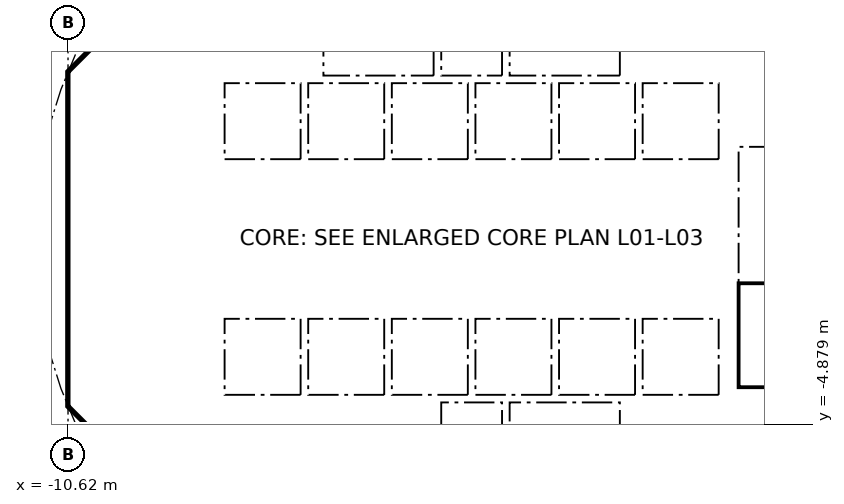
"""IFC4 building model, lengths in metres.
Left out: names, types, materials, properties, quantities, classifications, styles, units other than length and angle.
Written with IfcOpenShell. Run it as: python <this file> out.ifc"""

import sys

from ifc_helpers import new_model, si_unit, direction, frame, frame_2d, origin, place, context, subcontext, project, spatial, polyline, rectangle, outline, extrude, element, fill, save


model = new_model("IFC4")
c1 = context("Model", 3, precision=1e-05, world=origin(), true_north=direction((0.0, 1.0)))
c2 = subcontext(c1, "Body", "Model", "MODEL_VIEW")
j1 = project(units=[si_unit("LENGTHUNIT", "METRE"), si_unit("PLANEANGLEUNIT", "RADIAN")], contexts=[c1])
p1 = place(None, origin())
s1 = spatial("IfcSite", under=j1, at=p1, CompositionType="ELEMENT")
p2 = place(p1, origin())
s2 = spatial("IfcBuilding", under=s1, at=p2, CompositionType="ELEMENT")
p3 = place(p2, frame((0.0, 0.0, 17.0)))
s3 = spatial("IfcBuildingStorey", under=s2, at=p3, CompositionType="ELEMENT", Elevation=17.0)
p4 = place(p3, frame((9.988, 4.613, 0.0), z_axis=(0.0, 0.0, 1.0), x_axis=(-0.707106781187, 0.707106781187, 0.0)))
e1 = element("IfcWall", 1, at=p4, inside=s3, PredefinedType="SHEAR", context=c2, shape_type="SweptSolid", body=[
    extrude(rectangle(XDim=7.602, YDim=0.6, at=frame_2d((3.801, 0.0))), origin(), (0.0, 0.0, 1.0), 4.7),
])
p5 = place(p4, frame((3.201, 0.0, 0.0)))
e2 = element("IfcOpeningElement", 2, at=p5, cuts=e1, PredefinedType="OPENING", context=c2, shape_type="SweptSolid", body=[
    extrude(rectangle(XDim=1.2, YDim=2.1, at=frame_2d((0.6, 1.05))), frame((0.0, 0.31, 0.0), z_axis=(0.0, -1.0, 0.0), x_axis=(1.0, 0.0, 0.0)), (0.0, 0.0, 1.0), 0.62),
])
p6 = place(p3, frame((-4.613, 9.988, 0.0), z_axis=(0.0, 0.0, 1.0), x_axis=(-0.707106781187, -0.707106781187, 0.0)))
e3 = element("IfcWall", 3, at=p6, inside=s3, PredefinedType="SHEAR", context=c2, shape_type="SweptSolid", body=[
    extrude(rectangle(XDim=7.602, YDim=0.6, at=frame_2d((3.801, 0.0))), origin(), (0.0, 0.0, 1.0), 4.7),
])
p7 = place(p6, frame((0.351, 0.0, 0.0)))
e4 = element("IfcOpeningElement", 4, at=p7, cuts=e3, PredefinedType="OPENING", context=c2, shape_type="SweptSolid", body=[
    extrude(rectangle(XDim=1.1, YDim=2.1, at=frame_2d((0.55, 1.05))), frame((0.0, 0.31, 0.0), z_axis=(0.0, -1.0, 0.0), x_axis=(1.0, 0.0, 0.0)), (0.0, 0.0, 1.0), 0.62),
])
p8 = place(p3, frame((-10.325, 3.801, 0.0), z_axis=(0.0, 0.0, 1.0), x_axis=(0.0, -1.0, 0.0)))
e5 = element("IfcWall", 5, at=p8, inside=s3, PredefinedType="SHEAR", context=c2, shape_type="SweptSolid", body=[
    extrude(rectangle(XDim=7.602, YDim=0.6, at=frame_2d((3.801, 0.0))), origin(), (0.0, 0.0, 1.0), 4.7),
])
p9 = place(p8, frame((0.651, 0.0, 0.0)))
e6 = element("IfcOpeningElement", 6, at=p9, cuts=e5, PredefinedType="OPENING", context=c2, shape_type="SweptSolid", body=[
    extrude(rectangle(XDim=1.5, YDim=2.1, at=frame_2d((0.75, 1.05))), frame((0.0, 0.31, 0.0), z_axis=(0.0, -1.0, 0.0), x_axis=(1.0, 0.0, 0.0)), (0.0, 0.0, 1.0), 0.62),
])
p10 = place(p8, frame((5.451, 0.0, 0.0)))
e7 = element("IfcOpeningElement", 7, at=p10, cuts=e5, PredefinedType="OPENING", context=c2, shape_type="SweptSolid", body=[
    extrude(rectangle(XDim=1.5, YDim=2.1, at=frame_2d((0.75, 1.05))), frame((0.0, 0.31, 0.0), z_axis=(0.0, -1.0, 0.0), x_axis=(1.0, 0.0, 0.0)), (0.0, 0.0, 1.0), 0.62),
])
p11 = place(p3, frame((-9.988, -4.613, 0.0), z_axis=(0.0, 0.0, 1.0), x_axis=(0.707106781187, -0.707106781187, 0.0)))
e8 = element("IfcWall", 8, at=p11, inside=s3, PredefinedType="SHEAR", context=c2, shape_type="SweptSolid", body=[
    extrude(rectangle(XDim=7.602, YDim=0.6, at=frame_2d((3.801, 0.0))), origin(), (0.0, 0.0, 1.0), 4.7),
])
p12 = place(p11, frame((6.151, 0.0, 0.0)))
e9 = element("IfcOpeningElement", 9, at=p12, cuts=e8, PredefinedType="OPENING", context=c2, shape_type="SweptSolid", body=[
    extrude(rectangle(XDim=1.1, YDim=2.1, at=frame_2d((0.55, 1.05))), frame((0.0, 0.31, 0.0), z_axis=(0.0, -1.0, 0.0), x_axis=(1.0, 0.0, 0.0)), (0.0, 0.0, 1.0), 0.62),
])
p13 = place(p3, frame((4.613, -9.988, 0.0), z_axis=(0.0, 0.0, 1.0), x_axis=(0.707106781187, 0.707106781187, 0.0)))
e10 = element("IfcWall", 10, at=p13, inside=s3, PredefinedType="SHEAR", context=c2, shape_type="SweptSolid", body=[
    extrude(rectangle(XDim=7.602, YDim=0.6, at=frame_2d((3.801, 0.0))), origin(), (0.0, 0.0, 1.0), 4.7),
])
p14 = place(p13, frame((3.201, 0.0, 0.0)))
e11 = element("IfcOpeningElement", 11, at=p14, cuts=e10, PredefinedType="OPENING", context=c2, shape_type="SweptSolid", body=[
    extrude(rectangle(XDim=1.2, YDim=2.1, at=frame_2d((0.6, 1.05))), frame((0.0, 0.31, 0.0), z_axis=(0.0, -1.0, 0.0), x_axis=(1.0, 0.0, 0.0)), (0.0, 0.0, 1.0), 0.62),
])
p15 = place(p3, frame((-5.8, 4.3, 0.0), z_axis=(0.0, 0.0, 1.0), x_axis=(0.0, 1.0, 0.0)))
e12 = element("IfcWall", 12, at=p15, inside=s3, PredefinedType="PARTITIONING", context=c2, shape_type="SweptSolid", body=[
    extrude(rectangle(XDim=3.927, YDim=0.15, at=frame_2d((1.963, 0.0))), origin(), (0.0, 0.0, 1.0), 4.7),
])
p16 = place(p15, frame((1.551, 0.0, 0.0)))
e13 = element("IfcOpeningElement", 13, at=p16, cuts=e12, PredefinedType="OPENING", context=c2, shape_type="SweptSolid", body=[
    extrude(rectangle(XDim=0.9, YDim=2.1, at=frame_2d((0.45, 1.05))), frame((0.0, 0.085, 0.0), z_axis=(0.0, -1.0, 0.0), x_axis=(1.0, 0.0, 0.0)), (0.0, 0.0, 1.0), 0.17),
])
p17 = place(p3, frame((4.0, 4.3, 0.0), z_axis=(0.0, 0.0, 1.0), x_axis=(0.0, 1.0, 0.0)))
e14 = element("IfcWall", 14, at=p17, inside=s3, PredefinedType="SOLIDWALL", context=c2, shape_type="SweptSolid", body=[
    extrude(rectangle(XDim=2.2, YDim=0.2, at=frame_2d((1.1, 0.0))), origin(), (0.0, 0.0, 1.0), 4.7),
])
p18 = place(p17, frame((0.55, 0.0, 0.0)))
e15 = element("IfcOpeningElement", 15, at=p18, cuts=e14, PredefinedType="OPENING", context=c2, shape_type="SweptSolid", body=[
    extrude(rectangle(XDim=1.1, YDim=2.1, at=frame_2d((0.55, 1.05))), frame((0.0, 0.11, 0.0), z_axis=(0.0, -1.0, 0.0), x_axis=(1.0, 0.0, 0.0)), (0.0, 0.0, 1.0), 0.22),
])
p19 = place(p3, frame((-4.0, 4.3, 0.0), z_axis=(0.0, 0.0, 1.0), x_axis=(0.0, 1.0, 0.0)))
e16 = element("IfcWall", 16, at=p19, inside=s3, PredefinedType="SOLIDWALL", context=c2, shape_type="SweptSolid", body=[
    extrude(rectangle(XDim=2.2, YDim=0.2, at=frame_2d((1.1, 0.0))), origin(), (0.0, 0.0, 1.0), 4.7),
])
p20 = place(p19, frame((0.55, 0.0, 0.0)))
e17 = element("IfcOpeningElement", 17, at=p20, cuts=e16, PredefinedType="OPENING", context=c2, shape_type="SweptSolid", body=[
    extrude(rectangle(XDim=1.1, YDim=2.1, at=frame_2d((0.55, 1.05))), frame((0.0, 0.11, 0.0), z_axis=(0.0, -1.0, 0.0), x_axis=(1.0, 0.0, 0.0)), (0.0, 0.0, 1.0), 0.22),
])
p21 = place(p3, frame((-6.7, 2.0, 0.0), z_axis=(0.0, 0.0, 1.0), x_axis=(1.0, 0.0, 0.0)))
e18 = element("IfcWall", 18, at=p21, inside=s3, PredefinedType="SOLIDWALL", context=c2, shape_type="SweptSolid", body=[
    extrude(rectangle(XDim=13.4, YDim=0.2, at=frame_2d((6.7, 0.0))), origin(), (0.0, 0.0, 1.0), 4.7),
])
p22 = place(p21, frame((0.65, 0.0, 0.0)))
e19 = element("IfcOpeningElement", 19, at=p22, cuts=e18, PredefinedType="OPENING", context=c2, shape_type="SweptSolid", body=[
    extrude(rectangle(XDim=1.1, YDim=2.1, at=frame_2d((0.55, 1.05))), frame((0.0, 0.11, 0.0), z_axis=(0.0, -1.0, 0.0), x_axis=(1.0, 0.0, 0.0)), (0.0, 0.0, 1.0), 0.22),
])
p23 = place(p21, frame((2.85, 0.0, 0.0)))
e20 = element("IfcOpeningElement", 20, at=p23, cuts=e18, PredefinedType="OPENING", context=c2, shape_type="SweptSolid", body=[
    extrude(rectangle(XDim=1.1, YDim=2.1, at=frame_2d((0.55, 1.05))), frame((0.0, 0.11, 0.0), z_axis=(0.0, -1.0, 0.0), x_axis=(1.0, 0.0, 0.0)), (0.0, 0.0, 1.0), 0.22),
])
p24 = place(p21, frame((5.05, 0.0, 0.0)))
e21 = element("IfcOpeningElement", 21, at=p24, cuts=e18, PredefinedType="OPENING", context=c2, shape_type="SweptSolid", body=[
    extrude(rectangle(XDim=1.1, YDim=2.1, at=frame_2d((0.55, 1.05))), frame((0.0, 0.11, 0.0), z_axis=(0.0, -1.0, 0.0), x_axis=(1.0, 0.0, 0.0)), (0.0, 0.0, 1.0), 0.22),
])
p25 = place(p3, frame((6.7, 4.0, 0.0), z_axis=(0.0, 0.0, 1.0), x_axis=(1.0, 0.0, 0.0)))
e22 = element("IfcWall", 22, at=p25, inside=s3, PredefinedType="SOLIDWALL", context=c2, shape_type="SweptSolid", body=[
    extrude(rectangle(XDim=3.325, YDim=0.2, at=frame_2d((1.662, 0.0))), origin(), (0.0, 0.0, 1.0), 4.7),
])
p26 = place(p25, frame((1.25, 0.0, 0.0)))
e23 = element("IfcOpeningElement", 23, at=p26, cuts=e22, PredefinedType="OPENING", context=c2, shape_type="SweptSolid", body=[
    extrude(rectangle(XDim=1.1, YDim=2.1, at=frame_2d((0.55, 1.05))), frame((0.0, 0.11, 0.0), z_axis=(0.0, -1.0, 0.0), x_axis=(1.0, 0.0, 0.0)), (0.0, 0.0, 1.0), 0.22),
])
p27 = place(p3, frame((-5.8, -8.227, 0.0), z_axis=(0.0, 0.0, 1.0), x_axis=(0.0, 1.0, 0.0)))
e24 = element("IfcWall", 24, at=p27, inside=s3, PredefinedType="PARTITIONING", context=c2, shape_type="SweptSolid", body=[
    extrude(rectangle(XDim=3.927, YDim=0.15, at=frame_2d((1.963, 0.0))), origin(), (0.0, 0.0, 1.0), 4.7),
])
p28 = place(p27, frame((1.476, 0.0, 0.0)))
e25 = element("IfcOpeningElement", 25, at=p28, cuts=e24, PredefinedType="OPENING", context=c2, shape_type="SweptSolid", body=[
    extrude(rectangle(XDim=0.9, YDim=2.1, at=frame_2d((0.45, 1.05))), frame((0.0, 0.085, 0.0), z_axis=(0.0, -1.0, 0.0), x_axis=(1.0, 0.0, 0.0)), (0.0, 0.0, 1.0), 0.17),
])
p29 = place(p3, frame((4.0, -6.5, 0.0), z_axis=(0.0, 0.0, 1.0), x_axis=(0.0, 1.0, 0.0)))
e26 = element("IfcWall", 26, at=p29, inside=s3, PredefinedType="SOLIDWALL", context=c2, shape_type="SweptSolid", body=[
    extrude(rectangle(XDim=2.2, YDim=0.2, at=frame_2d((1.1, 0.0))), origin(), (0.0, 0.0, 1.0), 4.7),
])
p30 = place(p29, frame((0.55, 0.0, 0.0)))
e27 = element("IfcOpeningElement", 27, at=p30, cuts=e26, PredefinedType="OPENING", context=c2, shape_type="SweptSolid", body=[
    extrude(rectangle(XDim=1.1, YDim=2.1, at=frame_2d((0.55, 1.05))), frame((0.0, 0.11, 0.0), z_axis=(0.0, -1.0, 0.0), x_axis=(1.0, 0.0, 0.0)), (0.0, 0.0, 1.0), 0.22),
])
p31 = place(p3, frame((-4.0, -6.5, 0.0), z_axis=(0.0, 0.0, 1.0), x_axis=(0.0, 1.0, 0.0)))
e28 = element("IfcWall", 28, at=p31, inside=s3, PredefinedType="SOLIDWALL", context=c2, shape_type="SweptSolid", body=[
    extrude(rectangle(XDim=2.2, YDim=0.2, at=frame_2d((1.1, 0.0))), origin(), (0.0, 0.0, 1.0), 4.7),
])
p32 = place(p31, frame((0.65, 0.0, 0.0)))
e29 = element("IfcOpeningElement", 29, at=p32, cuts=e28, PredefinedType="OPENING", context=c2, shape_type="SweptSolid", body=[
    extrude(rectangle(XDim=0.9, YDim=2.1, at=frame_2d((0.45, 1.05))), frame((0.0, 0.11, 0.0), z_axis=(0.0, -1.0, 0.0), x_axis=(1.0, 0.0, 0.0)), (0.0, 0.0, 1.0), 0.22),
])
p33 = place(p3, frame((-6.7, -2.0, 0.0), z_axis=(0.0, 0.0, 1.0), x_axis=(1.0, 0.0, 0.0)))
e30 = element("IfcWall", 30, at=p33, inside=s3, PredefinedType="SOLIDWALL", context=c2, shape_type="SweptSolid", body=[
    extrude(rectangle(XDim=13.4, YDim=0.2, at=frame_2d((6.7, 0.0))), origin(), (0.0, 0.0, 1.0), 4.7),
])
p34 = place(p33, frame((0.65, 0.0, 0.0)))
e31 = element("IfcOpeningElement", 31, at=p34, cuts=e30, PredefinedType="OPENING", context=c2, shape_type="SweptSolid", body=[
    extrude(rectangle(XDim=1.1, YDim=2.1, at=frame_2d((0.55, 1.05))), frame((0.0, 0.11, 0.0), z_axis=(0.0, -1.0, 0.0), x_axis=(1.0, 0.0, 0.0)), (0.0, 0.0, 1.0), 0.22),
])
p35 = place(p33, frame((2.85, 0.0, 0.0)))
e32 = element("IfcOpeningElement", 32, at=p35, cuts=e30, PredefinedType="OPENING", context=c2, shape_type="SweptSolid", body=[
    extrude(rectangle(XDim=1.1, YDim=2.1, at=frame_2d((0.55, 1.05))), frame((0.0, 0.11, 0.0), z_axis=(0.0, -1.0, 0.0), x_axis=(1.0, 0.0, 0.0)), (0.0, 0.0, 1.0), 0.22),
])
p36 = place(p3, origin())
e33 = element("IfcWall", 33, at=p36, inside=s3, PredefinedType="SHEAR", context=c2, shape_type="SweptSolid", body=[
    extrude(outline(polyline([(-10.625, -3.801), (-10.025, -3.801), (-10.025, -4.152), (-9.776, -4.401), (-10.2, -4.825), (-10.625, -4.401), (-10.625, -3.801)])), origin(), (0.0, 0.0, 1.0), 4.7),
])
p37 = place(p3, origin())
e34 = element("IfcWall", 34, at=p37, inside=s3, PredefinedType="SHEAR", context=c2, shape_type="SweptSolid", body=[
    extrude(outline(polyline([(-10.2, 4.825), (-9.776, 4.401), (-10.025, 4.152), (-10.025, 3.801), (-10.625, 3.801), (-10.625, 4.401), (-10.2, 4.825)])), origin(), (0.0, 0.0, 1.0), 4.7),
])
for number, where, z_axis, x_axis in (
    (35, (-0.9, -6.5, 0.0), (0.0, 0.0, 1.0), (0.0, 1.0, 0.0)),
    (36, (0.9, -6.5, 0.0), (0.0, 0.0, 1.0), (0.0, 1.0, 0.0)),
):
    element("IfcWall", number, at=place(p3, frame(where, z_axis=z_axis, x_axis=x_axis)), inside=s3, PredefinedType="SOLIDWALL", context=c2, shape_type="SweptSolid", body=[
        extrude(rectangle(XDim=2.2, YDim=0.2, at=frame_2d((1.1, 0.0))), origin(), (0.0, 0.0, 1.0), 4.7),
    ])
p38 = place(p3, origin())
e37 = element("IfcWall", 37, at=p38, inside=s3, PredefinedType="SOLIDWALL", context=c2, shape_type="SweptSolid", body=[
    extrude(outline(polyline([(-6.7, -2.1), (-6.5, -2.1), (-6.5, -4.1), (-4.5, -4.1), (-4.5, -2.1), (-4.3, -2.1), (-4.3, -4.1), (-2.3, -4.1), (-2.3, -2.1), (-2.1, -2.1), (-2.1, -4.1), (-0.1, -4.1), (-0.1, -2.1), (0.1, -2.1), (0.1, -4.1), (2.1, -4.1), (2.1, -2.1), (2.3, -2.1), (2.3, -4.1), (4.3, -4.1), (4.3, -2.1), (4.5, -2.1), (4.5, -4.1), (6.5, -4.1), (6.5, -2.1), (6.7, -2.1), (6.7, -4.3), (-6.7, -4.3), (-6.7, -2.1)])), origin(), (0.0, 0.0, 1.0), 4.7),
])
for number, where, z_axis, x_axis in (
    (38, (-0.9, 4.3, 0.0), (0.0, 0.0, 1.0), (0.0, 1.0, 0.0)),
    (39, (0.9, 4.3, 0.0), (0.0, 0.0, 1.0), (0.0, 1.0, 0.0)),
):
    element("IfcWall", number, at=place(p3, frame(where, z_axis=z_axis, x_axis=x_axis)), inside=s3, PredefinedType="SOLIDWALL", context=c2, shape_type="SweptSolid", body=[
        extrude(rectangle(XDim=2.2, YDim=0.2, at=frame_2d((1.1, 0.0))), origin(), (0.0, 0.0, 1.0), 4.7),
    ])
p39 = place(p3, origin())
e40 = element("IfcWall", 40, at=p39, inside=s3, PredefinedType="SOLIDWALL", context=c2, shape_type="SweptSolid", body=[
    extrude(outline(polyline([(-6.5, 2.1), (-6.7, 2.1), (-6.7, 4.3), (6.7, 4.3), (6.7, 2.1), (6.5, 2.1), (6.5, 4.1), (4.5, 4.1), (4.5, 2.1), (4.3, 2.1), (4.3, 4.1), (2.3, 4.1), (2.3, 2.1), (2.1, 2.1), (2.1, 4.1), (0.1, 4.1), (0.1, 2.1), (-0.1, 2.1), (-0.1, 4.1), (-2.1, 4.1), (-2.1, 2.1), (-2.3, 2.1), (-2.3, 4.1), (-4.3, 4.1), (-4.3, 2.1), (-4.5, 2.1), (-4.5, 4.1), (-6.5, 4.1), (-6.5, 2.1)])), origin(), (0.0, 0.0, 1.0), 4.7),
])
for number, where, z_axis, x_axis in (
    (41, (-10.025, -4.0, 0.0), (0.0, 0.0, 1.0), (1.0, 0.0, 0.0)),
    (42, (-10.025, 4.0, 0.0), (0.0, 0.0, 1.0), (1.0, 0.0, 0.0)),
):
    element("IfcWall", number, at=place(p3, frame(where, z_axis=z_axis, x_axis=x_axis)), inside=s3, PredefinedType="PARTITIONING", context=c2, shape_type="SweptSolid", body=[
        extrude(rectangle(XDim=3.325, YDim=0.2, at=frame_2d((1.662, 0.0))), origin(), (0.0, 0.0, 1.0), 4.7),
    ])
p40 = place(p3, origin())
e43 = element("IfcWall", 43, at=p40, inside=s3, PredefinedType="SOLIDWALL", context=c2, shape_type="SweptSolid", body=[
    extrude(outline(polyline([(7.025, -3.9), (6.7, -3.9), (6.7, 3.9), (7.025, 3.9), (7.025, -3.9)])), origin(), (0.0, 0.0, 1.0), 4.7),
])
p41 = place(p3, origin())
e44 = element("IfcWall", 44, at=p41, inside=s3, PredefinedType="SOLIDWALL", context=c2, shape_type="SweptSolid", body=[
    extrude(outline(polyline([(10.025, -4.1), (6.7, -4.1), (6.7, -3.9), (10.025, -3.9), (10.025, -4.1)])), origin(), (0.0, 0.0, 1.0), 4.7),
])
p42 = place(p22, origin())
e45 = element("IfcDoor", 45, at=p42, inside=s3, OperationType="DOUBLE_DOOR_SLIDING", PredefinedType="DOOR", context=c2, shape_type="SweptSolid", body=[
    extrude(rectangle(XDim=1.1, YDim=2.1, at=frame_2d((0.55, 1.05))), frame((0.0, 0.025, 0.0), z_axis=(0.0, -1.0, 0.0), x_axis=(1.0, 0.0, 0.0)), (0.0, 0.0, 1.0), 0.05),
])
fill(e19, e45)
p43 = place(p23, origin())
e46 = element("IfcDoor", 46, at=p43, inside=s3, OperationType="DOUBLE_DOOR_SLIDING", PredefinedType="DOOR", context=c2, shape_type="SweptSolid", body=[
    extrude(rectangle(XDim=1.1, YDim=2.1, at=frame_2d((0.55, 1.05))), frame((0.0, 0.025, 0.0), z_axis=(0.0, -1.0, 0.0), x_axis=(1.0, 0.0, 0.0)), (0.0, 0.0, 1.0), 0.05),
])
fill(e20, e46)
p44 = place(p24, origin())
e47 = element("IfcDoor", 47, at=p44, inside=s3, OperationType="DOUBLE_DOOR_SLIDING", PredefinedType="DOOR", context=c2, shape_type="SweptSolid", body=[
    extrude(rectangle(XDim=1.1, YDim=2.1, at=frame_2d((0.55, 1.05))), frame((0.0, 0.025, 0.0), z_axis=(0.0, -1.0, 0.0), x_axis=(1.0, 0.0, 0.0)), (0.0, 0.0, 1.0), 0.05),
])
fill(e21, e47)
p45 = place(p34, origin())
e48 = element("IfcDoor", 48, at=p45, inside=s3, OperationType="DOUBLE_DOOR_SLIDING", PredefinedType="DOOR", context=c2, shape_type="SweptSolid", body=[
    extrude(rectangle(XDim=1.1, YDim=2.1, at=frame_2d((0.55, 1.05))), frame((0.0, 0.025, 0.0), z_axis=(0.0, -1.0, 0.0), x_axis=(1.0, 0.0, 0.0)), (0.0, 0.0, 1.0), 0.05),
])
fill(e31, e48)
p46 = place(p35, origin())
e49 = element("IfcDoor", 49, at=p46, inside=s3, OperationType="DOUBLE_DOOR_SLIDING", PredefinedType="DOOR", context=c2, shape_type="SweptSolid", body=[
    extrude(rectangle(XDim=1.1, YDim=2.1, at=frame_2d((0.55, 1.05))), frame((0.0, 0.025, 0.0), z_axis=(0.0, -1.0, 0.0), x_axis=(1.0, 0.0, 0.0)), (0.0, 0.0, 1.0), 0.05),
])
fill(e32, e49)
p47 = place(p18, origin())
e50 = element("IfcDoor", 50, at=p47, inside=s3, OperationType="DOUBLE_DOOR_SLIDING", PredefinedType="DOOR", context=c2, shape_type="SweptSolid", body=[
    extrude(rectangle(XDim=1.1, YDim=2.1, at=frame_2d((0.55, 1.05))), frame((0.0, 0.025, 0.0), z_axis=(0.0, -1.0, 0.0), x_axis=(1.0, 0.0, 0.0)), (0.0, 0.0, 1.0), 0.05),
])
fill(e15, e50)
p48 = place(p30, origin())
e51 = element("IfcDoor", 51, at=p48, inside=s3, OperationType="DOUBLE_DOOR_SLIDING", PredefinedType="DOOR", context=c2, shape_type="SweptSolid", body=[
    extrude(rectangle(XDim=1.1, YDim=2.1, at=frame_2d((0.55, 1.05))), frame((0.0, 0.025, 0.0), z_axis=(0.0, -1.0, 0.0), x_axis=(1.0, 0.0, 0.0)), (0.0, 0.0, 1.0), 0.05),
])
fill(e27, e51)
p49 = place(p20, origin())
e52 = element("IfcDoor", 52, at=p49, inside=s3, OperationType="DOUBLE_DOOR_SLIDING", PredefinedType="DOOR", context=c2, shape_type="SweptSolid", body=[
    extrude(rectangle(XDim=1.1, YDim=2.1, at=frame_2d((0.55, 1.05))), frame((0.0, 0.025, 0.0), z_axis=(0.0, -1.0, 0.0), x_axis=(1.0, 0.0, 0.0)), (0.0, 0.0, 1.0), 0.05),
])
fill(e17, e52)
p50 = place(p9, origin())
e53 = element("IfcDoor", 53, at=p50, inside=s3, OperationType="DOUBLE_DOOR_SINGLE_SWING", PredefinedType="DOOR", context=c2, shape_type="SweptSolid", body=[
    extrude(rectangle(XDim=1.5, YDim=2.1, at=frame_2d((0.75, 1.05))), frame((0.0, 0.025, 0.0), z_axis=(0.0, -1.0, 0.0), x_axis=(1.0, 0.0, 0.0)), (0.0, 0.0, 1.0), 0.05),
])
fill(e6, e53)
p51 = place(p10, origin())
e54 = element("IfcDoor", 54, at=p51, inside=s3, OperationType="DOUBLE_DOOR_SINGLE_SWING", PredefinedType="DOOR", context=c2, shape_type="SweptSolid", body=[
    extrude(rectangle(XDim=1.5, YDim=2.1, at=frame_2d((0.75, 1.05))), frame((0.0, 0.025, 0.0), z_axis=(0.0, -1.0, 0.0), x_axis=(1.0, 0.0, 0.0)), (0.0, 0.0, 1.0), 0.05),
])
fill(e7, e54)
save(model, sys.argv[1])
